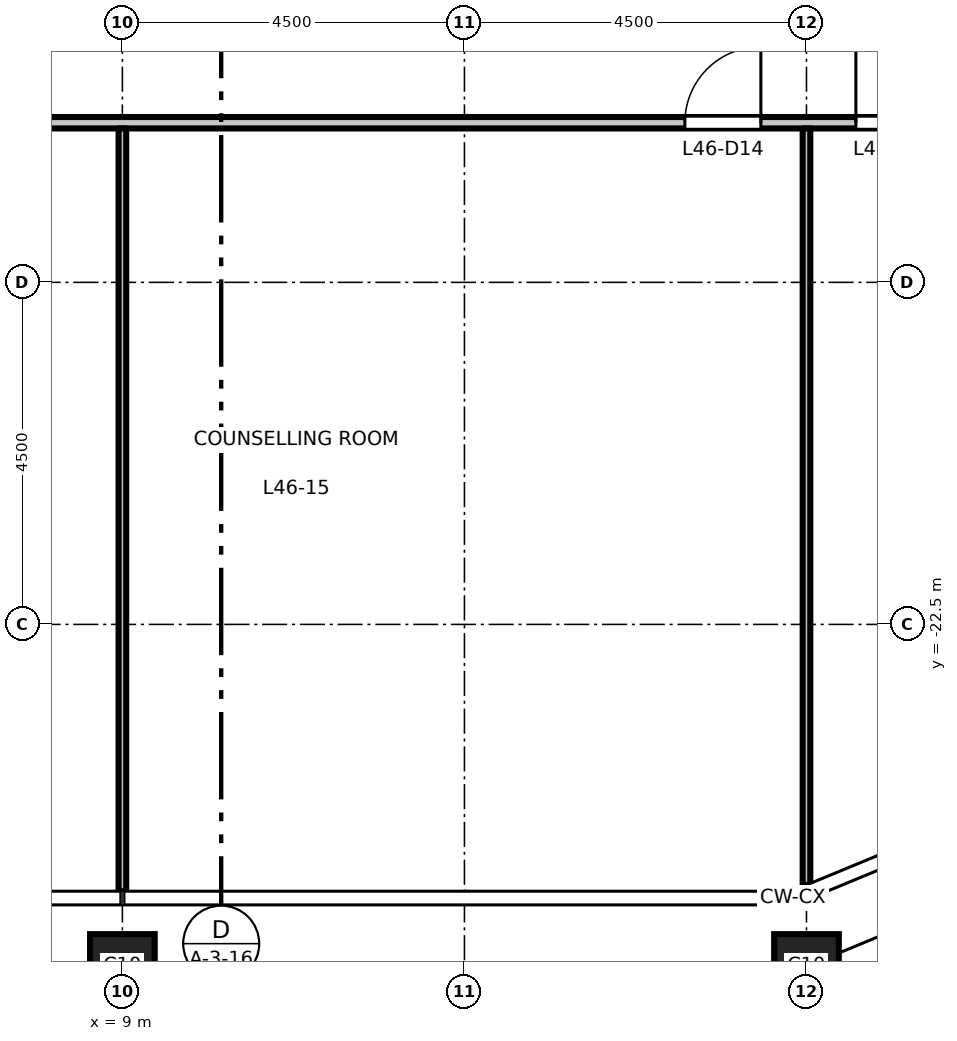
"""IFC4 building model, lengths in metres.
Left out: names, types, materials, properties, quantities, classifications, styles, units other than length and angle.
Written with IfcOpenShell. Run it as: python <this file> out.ifc"""

import sys

from ifc_helpers import new_model, si_unit, direction, frame, frame_2d, origin, origin_2d, place, context, subcontext, project, spatial, rectangle, hollow_rectangle, extrude, element, fill, save


model = new_model("IFC4")
c1 = context("Model", 3, precision=1e-05, world=origin(), true_north=direction((0.0, 1.0)))
c2 = subcontext(c1, "Body", "Model", "MODEL_VIEW")
j1 = project(units=[si_unit("LENGTHUNIT", "METRE"), si_unit("PLANEANGLEUNIT", "RADIAN")], contexts=[c1])
p1 = place(None, origin())
s1 = spatial("IfcSite", under=j1, at=p1, CompositionType="ELEMENT")
p2 = place(p1, origin())
s2 = spatial("IfcBuilding", under=s1, at=p2, CompositionType="ELEMENT")
p3 = place(p2, frame((0.0, 0.0, 215.2)))
s3 = spatial("IfcBuildingStorey", under=s2, at=p3, CompositionType="ELEMENT", Elevation=215.2)
for number, where, z_axis, x_axis in (
    (1, (9.0, -27.0, 0.0), (0.0, 0.0, 1.0), (1.0, 0.0, 0.0)),
    (2, (18.0, -27.0, 0.0), (0.0, 0.0, 1.0), (1.0, 0.0, 0.0)),
):
    element("IfcColumn", number, at=place(p3, frame(where, z_axis=z_axis, x_axis=x_axis)), inside=s3, PredefinedType="COLUMN", context=c2, shape_type="SweptSolid", body=[
        extrude(hollow_rectangle(XDim=0.85, YDim=0.85, WallThickness=0.05, at=origin_2d()), origin(), (0.0, 0.0, 1.0), 4.5),
    ])
p4 = place(p3, frame((-24.225, -15.9, 0.0), z_axis=(0.0, 0.0, 1.0), x_axis=(1.0, 0.0, 0.0)))
e3 = element("IfcWall", 3, at=p4, inside=s3, PredefinedType="PARTITIONING", context=c2, shape_type="SweptSolid", body=[
    extrude(rectangle(XDim=48.45, YDim=0.15, at=frame_2d((24.225, 0.0))), origin(), (0.0, 0.0, 1.0), 4.35),
])
p5 = place(p4, frame((6.875, 0.0, 0.0)))
e4 = element("IfcOpeningElement", 4, at=p5, cuts=e3, PredefinedType="OPENING", context=c2, shape_type="SweptSolid", body=[
    extrude(rectangle(XDim=1.0, YDim=2.1, at=frame_2d((0.5, 1.05))), frame((0.0, 0.085, 0.0), z_axis=(0.0, -1.0, 0.0), x_axis=(1.0, 0.0, 0.0)), (0.0, 0.0, 1.0), 0.17),
])
p6 = place(p4, frame((15.875, 0.0, 0.0)))
e5 = element("IfcOpeningElement", 5, at=p6, cuts=e3, PredefinedType="OPENING", context=c2, shape_type="SweptSolid", body=[
    extrude(rectangle(XDim=1.0, YDim=2.1, at=frame_2d((0.5, 1.05))), frame((0.0, 0.085, 0.0), z_axis=(0.0, -1.0, 0.0), x_axis=(1.0, 0.0, 0.0)), (0.0, 0.0, 1.0), 0.17),
])
p7 = place(p4, frame((24.875, 0.0, 0.0)))
e6 = element("IfcOpeningElement", 6, at=p7, cuts=e3, PredefinedType="OPENING", context=c2, shape_type="SweptSolid", body=[
    extrude(rectangle(XDim=1.0, YDim=2.1, at=frame_2d((0.5, 1.05))), frame((0.0, 0.085, 0.0), z_axis=(0.0, -1.0, 0.0), x_axis=(1.0, 0.0, 0.0)), (0.0, 0.0, 1.0), 0.17),
])
p8 = place(p4, frame((40.625, 0.0, 0.0)))
e7 = element("IfcOpeningElement", 7, at=p8, cuts=e3, PredefinedType="OPENING", context=c2, shape_type="SweptSolid", body=[
    extrude(rectangle(XDim=1.0, YDim=2.1, at=frame_2d((0.5, 1.05))), frame((0.0, 0.085, 0.0), z_axis=(0.0, -1.0, 0.0), x_axis=(1.0, 0.0, 0.0)), (0.0, 0.0, 1.0), 0.17),
])
p9 = place(p4, frame((4.725, 0.0, 0.0)))
e8 = element("IfcOpeningElement", 8, at=p9, cuts=e3, PredefinedType="OPENING", context=c2, shape_type="SweptSolid", body=[
    extrude(rectangle(XDim=1.0, YDim=2.1, at=frame_2d((0.5, 1.05))), frame((0.0, 0.085, 0.0), z_axis=(0.0, -1.0, 0.0), x_axis=(1.0, 0.0, 0.0)), (0.0, 0.0, 1.0), 0.17),
])
p10 = place(p4, frame((42.875, 0.0, 0.0)))
e9 = element("IfcOpeningElement", 9, at=p10, cuts=e3, PredefinedType="OPENING", context=c2, shape_type="SweptSolid", body=[
    extrude(rectangle(XDim=1.0, YDim=2.1, at=frame_2d((0.5, 1.05))), frame((0.0, 0.085, 0.0), z_axis=(0.0, -1.0, 0.0), x_axis=(1.0, 0.0, 0.0)), (0.0, 0.0, 1.0), 0.17),
])
p11 = place(p3, frame((9.0, -26.01, 0.0), z_axis=(0.0, 0.0, 1.0), x_axis=(0.0, 1.0, 0.0)))
e10 = element("IfcWall", 10, at=p11, inside=s3, PredefinedType="PARTITIONING", context=c2, shape_type="SweptSolid", body=[
    extrude(rectangle(XDim=10.035, YDim=0.1, at=frame_2d((5.018, 0.0))), origin(), (0.0, 0.0, 1.0), 3.65),
])
p12 = place(p3, frame((18.0, -25.928, 0.0), z_axis=(0.0, 0.0, 1.0), x_axis=(0.0, 1.0, 0.0)))
e11 = element("IfcWall", 11, at=p12, inside=s3, PredefinedType="PARTITIONING", context=c2, shape_type="SweptSolid", body=[
    extrude(rectangle(XDim=9.953, YDim=0.1, at=frame_2d((4.977, 0.0))), origin(), (0.0, 0.0, 1.0), 3.65),
])
p13 = place(p8, origin())
e12 = element("IfcDoor", 12, at=p13, inside=s3, OperationType="SINGLE_SWING_RIGHT", PredefinedType="DOOR", context=c2, shape_type="SweptSolid", body=[
    extrude(rectangle(XDim=1.0, YDim=2.1, at=frame_2d((0.5, 1.05))), frame((0.0, 0.025, 0.0), z_axis=(0.0, -1.0, 0.0), x_axis=(1.0, 0.0, 0.0)), (0.0, 0.0, 1.0), 0.05),
])
fill(e7, e12)
p14 = place(p10, origin())
e13 = element("IfcDoor", 13, at=p14, inside=s3, OperationType="SINGLE_SWING_LEFT", PredefinedType="DOOR", context=c2, shape_type="SweptSolid", body=[
    extrude(rectangle(XDim=1.0, YDim=2.1, at=frame_2d((0.5, 1.05))), frame((0.0, 0.025, 0.0), z_axis=(0.0, -1.0, 0.0), x_axis=(1.0, 0.0, 0.0)), (0.0, 0.0, 1.0), 0.05),
])
fill(e9, e13)
save(model, sys.argv[1])
